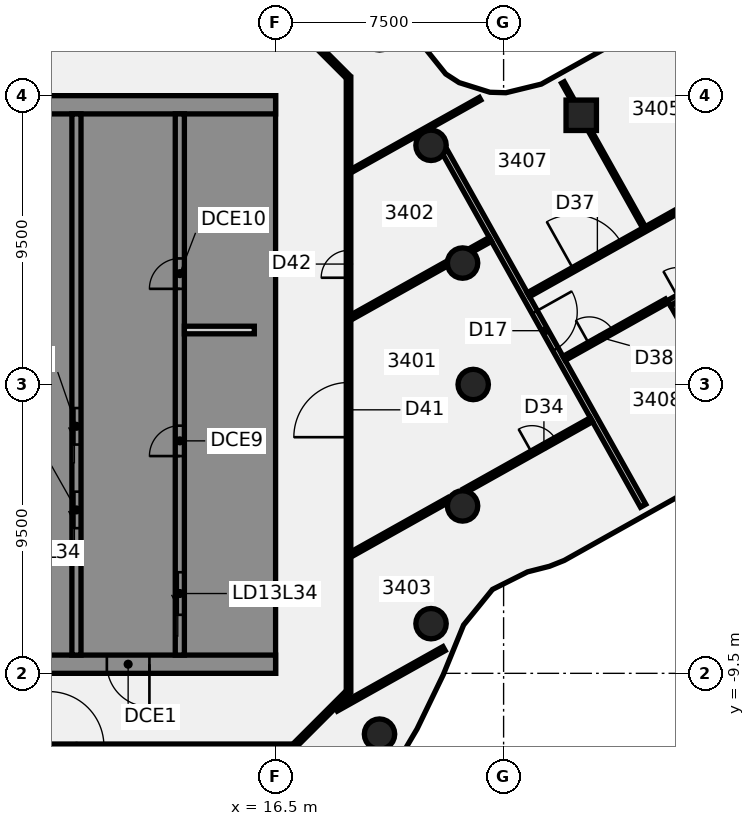
"""IFC4 building model, lengths in metres.
Left out: names, types, materials, properties, quantities, classifications, styles, units other than length and angle.
Written with IfcOpenShell. Run it as: python <this file> out.ifc"""

import sys

from ifc_helpers import new_model, si_unit, direction, frame, frame_2d, origin, origin_2d, place, context, subcontext, project, spatial, polyline, rectangle, circle, outline, extrude, element, fill, save


model = new_model("IFC4")
c1 = context("Model", 3, precision=1e-05, world=origin(), true_north=direction((0.0, 1.0)))
c2 = subcontext(c1, "Body", "Model", "MODEL_VIEW")
j1 = project(units=[si_unit("LENGTHUNIT", "METRE"), si_unit("PLANEANGLEUNIT", "RADIAN")], contexts=[c1])
p1 = place(None, origin())
s1 = spatial("IfcSite", under=j1, at=p1, CompositionType="ELEMENT")
p2 = place(p1, origin())
s2 = spatial("IfcBuilding", under=s1, at=p2, CompositionType="ELEMENT")
p3 = place(p2, frame((0.0, 0.0, 140.5)))
s3 = spatial("IfcBuildingStorey", under=s2, at=p3, CompositionType="ELEMENT", Elevation=140.5)
for number, where, z_axis, x_axis in (
    (1, (23.0, 0.0, -0.14), (0.0, 0.0, 1.0), (1.0, 0.0, 0.0)),
    (2, (22.651, 3.994, -0.14), (0.0, 0.0, 1.0), (1.0, 0.0, 0.0)),
    (3, (21.613, 7.866, -0.14), (0.0, 0.0, 1.0), (1.0, 0.0, 0.0)),
    (4, (19.919, -11.5, -0.14), (0.0, 0.0, 1.0), (1.0, 0.0, 0.0)),
    (5, (21.613, -7.866, -0.14), (0.0, 0.0, 1.0), (1.0, 0.0, 0.0)),
    (6, (22.651, -3.994, -0.14), (0.0, 0.0, 1.0), (1.0, 0.0, 0.0)),
):
    element("IfcColumn", number, at=place(p3, frame(where, z_axis=z_axis, x_axis=x_axis)), inside=s3, PredefinedType="COLUMN", context=c2, shape_type="SweptSolid", body=[
        extrude(circle(Radius=0.5, at=origin_2d()), origin(), (0.0, 0.0, 1.0), 3.75),
    ])
p4 = place(p3, frame((26.553, 8.855, -0.139), z_axis=(-0.043209514738, 0.02173490651, 0.998829580897), x_axis=(0.487666364721, -0.872109852448, 0.040073956407)))
e7 = element("IfcColumn", 7, at=p4, inside=s3, PredefinedType="COLUMN", context=c2, shape_type="SweptSolid", body=[
    extrude(rectangle(XDim=1.0, YDim=1.0, at=origin_2d()), origin(), (0.0, 0.0, 1.0), 3.752),
])
p5 = place(p3, frame((22.067, 7.656, 0.0), z_axis=(0.0, 0.0, 1.0), x_axis=(0.488719781304, -0.872440814819, 0.0)))
e8 = element("IfcWall", 8, at=p5, inside=s3, PredefinedType="PARTITIONING", context=c2, shape_type="SweptSolid", body=[
    extrude(rectangle(XDim=13.346, YDim=0.2, at=frame_2d((6.673, 0.0))), origin(), (0.0, 0.0, 1.0), 3.01),
])
p6 = place(p5, frame((6.048, 0.0, 0.0)))
e9 = element("IfcOpeningElement", 9, at=p6, cuts=e8, PredefinedType="OPENING", context=c2, shape_type="SweptSolid", body=[
    extrude(rectangle(XDim=1.4, YDim=2.1, at=frame_2d((0.7, 1.05))), frame((0.0, 0.11, 0.0), z_axis=(0.0, -1.0, 0.0), x_axis=(1.0, 0.0, 0.0)), (0.0, 0.0, 1.0), 0.22),
])
p7 = place(p3, frame((25.95, 9.931, 0.0), z_axis=(0.0, 0.0, 1.0), x_axis=(0.488985791787, -0.872291749033, 0.0)))
e10 = element("IfcWall", 10, at=p7, inside=s3, PredefinedType="PARTITIONING", context=c2, shape_type="SweptSolid", body=[
    extrude(rectangle(XDim=0.564, YDim=0.1, at=frame_2d((0.282, 0.0))), origin(), (0.0, 0.0, 1.0), 3.01),
])
p8 = place(p3, frame((26.809, 8.399, 0.0), z_axis=(0.0, 0.0, 1.0), x_axis=(0.488685692094, -0.872459909877, 0.0)))
e11 = element("IfcWall", 11, at=p8, inside=s3, PredefinedType="PARTITIONING", context=c2, shape_type="SweptSolid", body=[
    extrude(rectangle(XDim=3.702, YDim=0.1, at=frame_2d((1.851, 0.0))), origin(), (0.0, 0.0, 1.0), 3.01),
])
p9 = place(p3, frame((17.128, 11.872, 0.0), z_axis=(0.0, 0.0, 1.0), x_axis=(0.707106781187, -0.707106781187, 0.0)))
e12 = element("IfcWall", 12, at=p9, inside=s3, PredefinedType="PARTITIONING", context=c2, shape_type="SweptSolid", body=[
    extrude(rectangle(XDim=2.465, YDim=0.15, at=frame_2d((1.232, 0.0))), origin(), (0.0, 0.0, 1.0), 3.01),
])
p10 = place(p3, frame((-17.1, -11.9, 0.0), z_axis=(0.0, 0.0, 1.0), x_axis=(1.0, 0.0, 0.0)))
e13 = element("IfcWall", 13, at=p10, inside=s3, PredefinedType="PARTITIONING", context=c2, shape_type="SweptSolid", body=[
    extrude(rectangle(XDim=34.165, YDim=0.15, at=frame_2d((17.083, 0.0))), origin(), (0.0, 0.0, 1.0), 3.01),
])
p11 = place(p10, frame((10.546, 0.0, 0.0)))
e14 = element("IfcOpeningElement", 14, at=p11, cuts=e13, PredefinedType="OPENING", context=c2, shape_type="SweptSolid", body=[
    extrude(rectangle(XDim=1.8, YDim=2.1, at=frame_2d((0.9, 1.05))), frame((0.0, 0.085, 0.0), z_axis=(0.0, -1.0, 0.0), x_axis=(1.0, 0.0, 0.0)), (0.0, 0.0, 1.0), 0.17),
])
p12 = place(p10, frame((2.7, 0.0, 0.0)))
e15 = element("IfcOpeningElement", 15, at=p12, cuts=e13, PredefinedType="OPENING", context=c2, shape_type="SweptSolid", body=[
    extrude(rectangle(XDim=1.8, YDim=2.1, at=frame_2d((0.9, 1.05))), frame((0.0, 0.085, 0.0), z_axis=(0.0, -1.0, 0.0), x_axis=(1.0, 0.0, 0.0)), (0.0, 0.0, 1.0), 0.17),
])
p13 = place(p10, frame((26.154, 0.0, 0.0)))
e16 = element("IfcOpeningElement", 16, at=p13, cuts=e13, PredefinedType="OPENING", context=c2, shape_type="SweptSolid", body=[
    extrude(rectangle(XDim=1.8, YDim=2.1, at=frame_2d((0.9, 1.05))), frame((0.0, 0.085, 0.0), z_axis=(0.0, -1.0, 0.0), x_axis=(1.0, 0.0, 0.0)), (0.0, 0.0, 1.0), 0.17),
])
p14 = place(p3, frame((18.494, -10.675, 0.0), z_axis=(0.0, 0.0, 1.0), x_axis=(0.872412835083, 0.488769726131, 0.0)))
e17 = element("IfcWall", 17, at=p14, inside=s3, PredefinedType="PARTITIONING", context=c2, shape_type="SweptSolid", body=[
    extrude(rectangle(XDim=4.066, YDim=0.15, at=frame_2d((2.033, 0.0))), origin(), (0.0, 0.0, 1.0), 3.01),
])
p15 = place(p3, frame((18.996, -5.579, 0.0), z_axis=(0.0, 0.0, 1.0), x_axis=(0.872475366489, 0.488658096086, 0.0)))
e18 = element("IfcWall", 18, at=p15, inside=s3, PredefinedType="PARTITIONING", context=c2, shape_type="SweptSolid", body=[
    extrude(rectangle(XDim=3.668, YDim=0.15, at=frame_2d((1.834, 0.0))), origin(), (0.0, 0.0, 1.0), 3.01),
])
p16 = place(p3, frame((22.709, -3.5, 0.0), z_axis=(0.0, 0.0, 1.0), x_axis=(0.872484295483, 0.488642153458, 0.0)))
e19 = element("IfcWall", 19, at=p16, inside=s3, PredefinedType="PARTITIONING", context=c2, shape_type="SweptSolid", body=[
    extrude(rectangle(XDim=4.792, YDim=0.15, at=frame_2d((2.396, 0.0))), origin(), (0.0, 0.0, 1.0), 3.01),
])
p17 = place(p16, frame((2.55, 0.0, 0.0)))
e20 = element("IfcOpeningElement", 20, at=p17, cuts=e19, PredefinedType="OPENING", context=c2, shape_type="SweptSolid", body=[
    extrude(rectangle(XDim=0.9, YDim=2.1, at=frame_2d((0.45, 1.05))), frame((0.0, 0.085, 0.0), z_axis=(0.0, -1.0, 0.0), x_axis=(1.0, 0.0, 0.0)), (0.0, 0.0, 1.0), 0.17),
])
p18 = place(p3, frame((18.996, 2.215, 0.0), z_axis=(0.0, 0.0, 1.0), x_axis=(0.872502555335, 0.488609548549, 0.0)))
e21 = element("IfcWall", 21, at=p18, inside=s3, PredefinedType="PARTITIONING", context=c2, shape_type="SweptSolid", body=[
    extrude(rectangle(XDim=3.609, YDim=0.15, at=frame_2d((1.805, 0.0))), origin(), (0.0, 0.0, 1.0), 3.01),
])
p19 = place(p3, frame((22.926, 4.415, 0.0), z_axis=(0.0, 0.0, 1.0), x_axis=(0.87250601595, 0.488603368932, 0.0)))
e22 = element("IfcWall", 22, at=p19, inside=s3, PredefinedType="PARTITIONING", context=c2, shape_type="SweptSolid", body=[
    extrude(rectangle(XDim=0.735, YDim=0.15, at=frame_2d((0.367, 0.0))), origin(), (0.0, 0.0, 1.0), 3.01),
])
p20 = place(p3, frame((18.983, 7.021, 0.0), z_axis=(0.0, 0.0, 1.0), x_axis=(0.872449517154, 0.488704245959, 0.0)))
e23 = element("IfcWall", 23, at=p20, inside=s3, PredefinedType="PARTITIONING", context=c2, shape_type="SweptSolid", body=[
    extrude(rectangle(XDim=4.864, YDim=0.1, at=frame_2d((2.432, 0.0))), origin(), (0.0, 0.0, 1.0), 3.01),
])
p21 = place(p3, frame((24.816, 2.953, 0.0), z_axis=(0.0, 0.0, 1.0), x_axis=(0.87246758345, 0.488671992066, 0.0)))
e24 = element("IfcWall", 24, at=p21, inside=s3, PredefinedType="PARTITIONING", context=c2, shape_type="SweptSolid", body=[
    extrude(rectangle(XDim=13.325, YDim=0.15, at=frame_2d((6.663, 0.0))), origin(), (0.0, 0.0, 1.0), 3.01),
])
p22 = place(p21, frame((6.8, 0.0, 0.0)))
e25 = element("IfcOpeningElement", 25, at=p22, cuts=e24, PredefinedType="OPENING", context=c2, shape_type="SweptSolid", body=[
    extrude(rectangle(XDim=0.9, YDim=2.1, at=frame_2d((0.45, 1.05))), frame((0.0, 0.085, 0.0), z_axis=(0.0, -1.0, 0.0), x_axis=(1.0, 0.0, 0.0)), (0.0, 0.0, 1.0), 0.17),
])
p23 = place(p21, frame((10.1, 0.0, 0.0)))
e26 = element("IfcOpeningElement", 26, at=p23, cuts=e24, PredefinedType="OPENING", context=c2, shape_type="SweptSolid", body=[
    extrude(rectangle(XDim=0.9, YDim=2.1, at=frame_2d((0.45, 1.05))), frame((0.0, 0.085, 0.0), z_axis=(0.0, -1.0, 0.0), x_axis=(1.0, 0.0, 0.0)), (0.0, 0.0, 1.0), 0.17),
])
p24 = place(p21, frame((1.7, 0.0, 0.0)))
e27 = element("IfcOpeningElement", 27, at=p24, cuts=e24, PredefinedType="OPENING", context=c2, shape_type="SweptSolid", body=[
    extrude(rectangle(XDim=1.8, YDim=2.1, at=frame_2d((0.9, 1.05))), frame((0.0, 0.085, 0.0), z_axis=(0.0, -1.0, 0.0), x_axis=(1.0, 0.0, 0.0)), (0.0, 0.0, 1.0), 0.17),
])
p25 = place(p3, frame((25.989, 0.859, 0.0), z_axis=(0.0, 0.0, 1.0), x_axis=(0.872442375401, 0.488716995413, 0.0)))
e28 = element("IfcWall", 28, at=p25, inside=s3, PredefinedType="PARTITIONING", context=c2, shape_type="SweptSolid", body=[
    extrude(rectangle(XDim=3.86, YDim=0.15, at=frame_2d((1.93, 0.0))), origin(), (0.0, 0.0, 1.0), 3.01),
])
p26 = place(p25, frame((0.95, 0.0, 0.0)))
e29 = element("IfcOpeningElement", 29, at=p26, cuts=e28, PredefinedType="OPENING", context=c2, shape_type="SweptSolid", body=[
    extrude(rectangle(XDim=0.9, YDim=2.1, at=frame_2d((0.45, 1.05))), frame((0.0, 0.085, 0.0), z_axis=(0.0, -1.0, 0.0), x_axis=(1.0, 0.0, 0.0)), (0.0, 0.0, 1.0), 0.17),
])
p27 = place(p3, frame((17.1, -11.9, 0.0), z_axis=(0.0, 0.0, 1.0), x_axis=(0.707106781187, 0.707106781187, 0.0)))
e30 = element("IfcWall", 30, at=p27, inside=s3, PredefinedType="PARTITIONING", context=c2, shape_type="SweptSolid", body=[
    extrude(rectangle(XDim=2.505, YDim=0.15, at=frame_2d((1.253, 0.0))), origin(), (0.0, 0.0, 1.0), 3.01),
])
p28 = place(p3, frame((18.9, -10.1, 0.0), z_axis=(0.0, 0.0, 1.0), x_axis=(0.0, 1.0, 0.0)))
e31 = element("IfcWall", 31, at=p28, inside=s3, PredefinedType="PARTITIONING", context=c2, shape_type="SweptSolid", body=[
    extrude(rectangle(XDim=20.2, YDim=0.15, at=frame_2d((10.1, 0.0))), origin(), (0.0, 0.0, 1.0), 3.01),
])
p29 = place(p28, frame((8.367, 0.0, 0.0)))
e32 = element("IfcOpeningElement", 32, at=p29, cuts=e31, PredefinedType="OPENING", context=c2, shape_type="SweptSolid", body=[
    extrude(rectangle(XDim=1.8, YDim=2.1, at=frame_2d((0.9, 1.05))), frame((0.0, 0.085, 0.0), z_axis=(0.0, -1.0, 0.0), x_axis=(1.0, 0.0, 0.0)), (0.0, 0.0, 1.0), 0.17),
])
p30 = place(p28, frame((13.611, 0.0, 0.0)))
e33 = element("IfcOpeningElement", 33, at=p30, cuts=e31, PredefinedType="OPENING", context=c2, shape_type="SweptSolid", body=[
    extrude(rectangle(XDim=0.9, YDim=2.1, at=frame_2d((0.45, 1.05))), frame((0.0, 0.085, 0.0), z_axis=(0.0, -1.0, 0.0), x_axis=(1.0, 0.0, 0.0)), (0.0, 0.0, 1.0), 0.17),
])
p31 = place(p3, frame((16.5, -9.2, 0.0), z_axis=(0.0, 0.0, 1.0), x_axis=(-1.0, 0.0, 0.0)))
e34 = element("IfcWall", 34, at=p31, inside=s3, PredefinedType="SHEAR", context=c2, shape_type="SweptSolid", body=[
    extrude(rectangle(XDim=13.0, YDim=0.6, at=frame_2d((6.5, 0.0))), origin(), (0.0, 0.0, 1.0), 3.61),
])
p32 = place(p31, frame((4.15, 0.0, 0.0)))
e35 = element("IfcOpeningElement", 35, at=p32, cuts=e34, PredefinedType="OPENING", context=c2, shape_type="SweptSolid", body=[
    extrude(rectangle(XDim=1.4, YDim=2.1, at=frame_2d((0.7, 1.05))), frame((0.0, 0.31, 0.0), z_axis=(0.0, -1.0, 0.0), x_axis=(1.0, 0.0, 0.0)), (0.0, 0.0, 1.0), 0.62),
])
p33 = place(p31, frame((10.125, 0.0, 0.0)))
e36 = element("IfcOpeningElement", 36, at=p33, cuts=e34, PredefinedType="OPENING", context=c2, shape_type="SweptSolid", body=[
    extrude(rectangle(XDim=1.4, YDim=2.1, at=frame_2d((0.7, 1.05))), frame((0.0, 0.31, 0.0), z_axis=(0.0, -1.0, 0.0), x_axis=(1.0, 0.0, 0.0)), (0.0, 0.0, 1.0), 0.62),
])
p34 = place(p3, origin())
e37 = element("IfcWall", 37, at=p34, inside=s3, PredefinedType="SHEAR", context=c2, shape_type="SweptSolid", body=[
    extrude(outline(polyline([(13.5, -8.125), (13.5, -8.9), (15.9, -8.9), (16.5, -8.9), (16.5, 8.9), (15.9, 8.9), (13.5, 8.9), (13.5, 8.125), (15.9, 8.125), (15.9, 5.625), (13.5, 5.625), (13.5, 5.375), (15.9, 5.375), (15.9, -5.375), (13.5, -5.375), (13.5, -5.625), (15.9, -5.625), (15.9, -8.125), (13.5, -8.125)])), origin(), (0.0, 0.0, 1.0), 3.61),
])
p35 = place(p3, frame((16.5, 9.2, 0.0), z_axis=(0.0, 0.0, 1.0), x_axis=(-1.0, 0.0, 0.0)))
e38 = element("IfcWall", 38, at=p35, inside=s3, PredefinedType="SHEAR", context=c2, shape_type="SweptSolid", body=[
    extrude(rectangle(XDim=13.0, YDim=0.6, at=frame_2d((6.5, 0.0))), origin(), (0.0, 0.0, 1.0), 3.61),
])
p36 = place(p3, origin())
e39 = element("IfcWall", 39, at=p36, inside=s3, PredefinedType="SHEAR", context=c2, shape_type="SweptSolid", body=[
    extrude(outline(polyline([(9.8, -5.375), (7.5, -5.375), (7.5, -2.875), (9.8, -2.875), (9.8, -2.625), (7.5, -2.625), (7.5, -0.125), (9.8, -0.125), (9.8, 0.125), (7.5, 0.125), (7.5, 2.625), (9.8, 2.625), (9.8, 2.875), (7.5, 2.875), (7.5, 5.375), (9.8, 5.375), (9.8, 5.625), (7.5, 5.625), (7.5, 8.125), (9.8, 8.125), (9.8, 8.9), (7.5, 8.9), (7.2, 8.9), (7.2, -5.625), (7.5, -5.625), (9.8, -5.625), (9.8, -5.375)])), origin(), (0.0, 0.0, 1.0), 3.61),
])
p37 = place(p3, origin())
e40 = element("IfcWall", 40, at=p37, inside=s3, PredefinedType="SHEAR", context=c2, shape_type="SweptSolid", body=[
    extrude(outline(polyline([(7.5, -8.125), (7.5, -8.9), (9.8, -8.9), (9.8, -8.125), (9.8, -5.625), (9.55, -5.625), (9.55, -8.125), (7.5, -8.125)])), origin(), (0.0, 0.0, 1.0), 3.61),
])
p38 = place(p3, frame((13.35, -8.9, 0.0), z_axis=(0.0, 0.0, 1.0), x_axis=(0.0, 1.0, 0.0)))
e41 = element("IfcWall", 41, at=p38, inside=s3, PredefinedType="SHEAR", context=c2, shape_type="SweptSolid", body=[
    extrude(rectangle(XDim=17.8, YDim=0.3, at=frame_2d((8.9, 0.0))), origin(), (0.0, 0.0, 1.0), 3.61),
])
p39 = place(p38, frame((1.325, 0.0, 0.0)))
e42 = element("IfcOpeningElement", 42, at=p39, cuts=e41, PredefinedType="OPENING", context=c2, shape_type="SweptSolid", body=[
    extrude(rectangle(XDim=1.4, YDim=2.1, at=frame_2d((0.7, 1.05))), frame((0.0, 0.16, 0.0), z_axis=(0.0, -1.0, 0.0), x_axis=(1.0, 0.0, 0.0)), (0.0, 0.0, 1.0), 0.32),
])
p40 = place(p38, frame((6.546, 0.0, 0.0)))
e43 = element("IfcOpeningElement", 43, at=p40, cuts=e41, PredefinedType="OPENING", context=c2, shape_type="SweptSolid", body=[
    extrude(rectangle(XDim=1.0, YDim=2.1, at=frame_2d((0.5, 1.05))), frame((0.0, 0.16, 0.0), z_axis=(0.0, -1.0, 0.0), x_axis=(1.0, 0.0, 0.0)), (0.0, 0.0, 1.0), 0.32),
])
p41 = place(p38, frame((12.046, 0.0, 0.0)))
e44 = element("IfcOpeningElement", 44, at=p41, cuts=e41, PredefinedType="OPENING", context=c2, shape_type="SweptSolid", body=[
    extrude(rectangle(XDim=1.0, YDim=2.1, at=frame_2d((0.5, 1.05))), frame((0.0, 0.16, 0.0), z_axis=(0.0, -1.0, 0.0), x_axis=(1.0, 0.0, 0.0)), (0.0, 0.0, 1.0), 0.32),
])
p42 = place(p3, frame((9.95, -8.9, 0.0), z_axis=(0.0, 0.0, 1.0), x_axis=(0.0, 1.0, 0.0)))
e45 = element("IfcWall", 45, at=p42, inside=s3, PredefinedType="SHEAR", context=c2, shape_type="SweptSolid", body=[
    extrude(rectangle(XDim=17.8, YDim=0.3, at=frame_2d((8.9, 0.0))), origin(), (0.0, 0.0, 1.0), 3.61),
])
p43 = place(p42, frame((4.175, 0.0, 0.0)))
e46 = element("IfcOpeningElement", 46, at=p43, cuts=e45, PredefinedType="OPENING", context=c2, shape_type="SweptSolid", body=[
    extrude(rectangle(XDim=1.2, YDim=2.1, at=frame_2d((0.6, 1.05))), frame((0.0, 0.16, 0.0), z_axis=(0.0, -1.0, 0.0), x_axis=(1.0, 0.0, 0.0)), (0.0, 0.0, 1.0), 0.32),
])
p44 = place(p42, frame((6.925, 0.0, 0.0)))
e47 = element("IfcOpeningElement", 47, at=p44, cuts=e45, PredefinedType="OPENING", context=c2, shape_type="SweptSolid", body=[
    extrude(rectangle(XDim=1.2, YDim=2.1, at=frame_2d((0.6, 1.05))), frame((0.0, 0.16, 0.0), z_axis=(0.0, -1.0, 0.0), x_axis=(1.0, 0.0, 0.0)), (0.0, 0.0, 1.0), 0.32),
])
p45 = place(p3, frame((15.8, 1.792, 0.0), z_axis=(0.0, 0.0, 1.0), x_axis=(-1.0, 0.0, 0.0)))
e48 = element("IfcWall", 48, at=p45, inside=s3, PredefinedType="PARTITIONING", context=c2, shape_type="SweptSolid", body=[
    extrude(rectangle(XDim=2.3, YDim=0.25, at=frame_2d((1.15, 0.0))), origin(), (0.0, 0.0, 1.0), 3.61),
])
p46 = place(p3, frame((29.44, 2.677, -0.14), z_axis=(0.0, 0.0, 1.0), x_axis=(0.872445115734, 0.488712103422, 0.0)))
e49 = element("IfcWall", 49, at=p46, inside=s3, PredefinedType="SHEAR", context=c2, shape_type="SweptSolid", body=[
    extrude(rectangle(XDim=6.7, YDim=0.2, at=frame_2d((3.35, 0.0))), origin(), (0.0, 0.0, 1.0), 3.15),
])
p47 = place(p46, frame((0.35, 0.0, 0.0)))
e50 = element("IfcOpeningElement", 50, at=p47, cuts=e49, PredefinedType="OPENING", context=c2, shape_type="SweptSolid", body=[
    extrude(rectangle(XDim=1.0, YDim=2.1, at=frame_2d((0.5, 1.05))), frame((0.0, 0.11, 0.0), z_axis=(0.0, -1.0, 0.0), x_axis=(1.0, 0.0, 0.0)), (0.0, 0.0, 1.0), 0.22),
])
p48 = place(p3, frame((31.14, -0.153, -0.14), z_axis=(0.0, 0.0, 1.0), x_axis=(-0.488684682526, 0.87246047536, 0.0)))
e51 = element("IfcWall", 51, at=p48, inside=s3, PredefinedType="SHEAR", context=c2, shape_type="SweptSolid", body=[
    extrude(rectangle(XDim=3.2, YDim=0.2, at=frame_2d((1.6, 0.0))), origin(), (0.0, 0.0, 1.0), 3.15),
])
p49 = place(p6, frame((1.4, 0.0, 0.0), z_axis=(0.0, 0.0, 1.0), x_axis=(-1.0, 0.0, 0.0)))
e52 = element("IfcDoor", 52, at=p49, inside=s3, OperationType="DOUBLE_DOOR_SINGLE_SWING", PredefinedType="DOOR", context=c2, shape_type="SweptSolid", body=[
    extrude(rectangle(XDim=1.4, YDim=2.1, at=frame_2d((0.7, 1.05))), frame((0.0, 0.025, 0.0), z_axis=(0.0, -1.0, 0.0), x_axis=(1.0, 0.0, 0.0)), (0.0, 0.0, 1.0), 0.05),
])
fill(e9, e52)
p50 = place(p13, frame((1.8, 0.0, 0.0), z_axis=(0.0, 0.0, 1.0), x_axis=(-1.0, 0.0, 0.0)))
e53 = element("IfcDoor", 53, at=p50, inside=s3, OperationType="DOUBLE_DOOR_SINGLE_SWING", PredefinedType="DOOR", context=c2, shape_type="SweptSolid", body=[
    extrude(rectangle(XDim=1.8, YDim=2.1, at=frame_2d((0.9, 1.05))), frame((0.0, 0.025, 0.0), z_axis=(0.0, -1.0, 0.0), x_axis=(1.0, 0.0, 0.0)), (0.0, 0.0, 1.0), 0.05),
])
fill(e16, e53)
p51 = place(p17, frame((0.9, 0.0, 0.0), z_axis=(0.0, 0.0, 1.0), x_axis=(-1.0, 0.0, 0.0)))
e54 = element("IfcDoor", 54, at=p51, inside=s3, OperationType="SINGLE_SWING_RIGHT", PredefinedType="DOOR", context=c2, shape_type="SweptSolid", body=[
    extrude(rectangle(XDim=0.9, YDim=2.1, at=frame_2d((0.45, 1.05))), frame((0.0, 0.025, 0.0), z_axis=(0.0, -1.0, 0.0), x_axis=(1.0, 0.0, 0.0)), (0.0, 0.0, 1.0), 0.05),
])
fill(e20, e54)
p52 = place(p24, origin())
e55 = element("IfcDoor", 55, at=p52, inside=s3, OperationType="DOUBLE_DOOR_SINGLE_SWING", PredefinedType="DOOR", context=c2, shape_type="SweptSolid", body=[
    extrude(rectangle(XDim=1.8, YDim=2.1, at=frame_2d((0.9, 1.05))), frame((0.0, 0.025, 0.0), z_axis=(0.0, -1.0, 0.0), x_axis=(1.0, 0.0, 0.0)), (0.0, 0.0, 1.0), 0.05),
])
fill(e27, e55)
p53 = place(p26, frame((0.9, 0.0, 0.0), z_axis=(0.0, 0.0, 1.0), x_axis=(-1.0, 0.0, 0.0)))
e56 = element("IfcDoor", 56, at=p53, inside=s3, OperationType="SINGLE_SWING_LEFT", PredefinedType="DOOR", context=c2, shape_type="SweptSolid", body=[
    extrude(rectangle(XDim=0.9, YDim=2.1, at=frame_2d((0.45, 1.05))), frame((0.0, 0.025, 0.0), z_axis=(0.0, -1.0, 0.0), x_axis=(1.0, 0.0, 0.0)), (0.0, 0.0, 1.0), 0.05),
])
fill(e29, e56)
p54 = place(p29, origin())
e57 = element("IfcDoor", 57, at=p54, inside=s3, OperationType="DOUBLE_DOOR_SINGLE_SWING", PredefinedType="DOOR", context=c2, shape_type="SweptSolid", body=[
    extrude(rectangle(XDim=1.8, YDim=2.1, at=frame_2d((0.9, 1.05))), frame((0.0, 0.025, 0.0), z_axis=(0.0, -1.0, 0.0), x_axis=(1.0, 0.0, 0.0)), (0.0, 0.0, 1.0), 0.05),
])
fill(e32, e57)
p55 = place(p30, frame((0.9, 0.0, 0.0), z_axis=(0.0, 0.0, 1.0), x_axis=(-1.0, 0.0, 0.0)))
e58 = element("IfcDoor", 58, at=p55, inside=s3, OperationType="SINGLE_SWING_RIGHT", PredefinedType="DOOR", context=c2, shape_type="SweptSolid", body=[
    extrude(rectangle(XDim=0.9, YDim=2.1, at=frame_2d((0.45, 1.05))), frame((0.0, 0.025, 0.0), z_axis=(0.0, -1.0, 0.0), x_axis=(1.0, 0.0, 0.0)), (0.0, 0.0, 1.0), 0.05),
])
fill(e33, e58)
p56 = place(p32, origin())
e59 = element("IfcDoor", 59, at=p56, inside=s3, OperationType="SINGLE_SWING_LEFT", PredefinedType="DOOR", context=c2, shape_type="SweptSolid", body=[
    extrude(rectangle(XDim=1.4, YDim=2.1, at=frame_2d((0.7, 1.05))), frame((0.0, 0.025, 0.0), z_axis=(0.0, -1.0, 0.0), x_axis=(1.0, 0.0, 0.0)), (0.0, 0.0, 1.0), 0.05),
])
fill(e35, e59)
p57 = place(p39, origin())
e60 = element("IfcDoor", 60, at=p57, inside=s3, OperationType="SLIDING_TO_LEFT", PredefinedType="DOOR", context=c2, shape_type="SweptSolid", body=[
    extrude(rectangle(XDim=1.4, YDim=2.1, at=frame_2d((0.7, 1.05))), frame((0.0, 0.025, 0.0), z_axis=(0.0, -1.0, 0.0), x_axis=(1.0, 0.0, 0.0)), (0.0, 0.0, 1.0), 0.05),
])
fill(e42, e60)
p58 = place(p43, origin())
e61 = element("IfcDoor", 61, at=p58, inside=s3, OperationType="SLIDING_TO_LEFT", PredefinedType="DOOR", context=c2, shape_type="SweptSolid", body=[
    extrude(rectangle(XDim=1.2, YDim=2.1, at=frame_2d((0.6, 1.05))), frame((0.0, 0.025, 0.0), z_axis=(0.0, -1.0, 0.0), x_axis=(1.0, 0.0, 0.0)), (0.0, 0.0, 1.0), 0.05),
])
fill(e46, e61)
p59 = place(p44, origin())
e62 = element("IfcDoor", 62, at=p59, inside=s3, OperationType="SLIDING_TO_LEFT", PredefinedType="DOOR", context=c2, shape_type="SweptSolid", body=[
    extrude(rectangle(XDim=1.2, YDim=2.1, at=frame_2d((0.6, 1.05))), frame((0.0, 0.025, 0.0), z_axis=(0.0, -1.0, 0.0), x_axis=(1.0, 0.0, 0.0)), (0.0, 0.0, 1.0), 0.05),
])
fill(e47, e62)
p60 = place(p40, origin())
e63 = element("IfcDoor", 63, at=p60, inside=s3, OperationType="SINGLE_SWING_LEFT", PredefinedType="DOOR", context=c2, shape_type="SweptSolid", body=[
    extrude(rectangle(XDim=1.0, YDim=2.1, at=frame_2d((0.5, 1.05))), frame((0.0, 0.025, 0.0), z_axis=(0.0, -1.0, 0.0), x_axis=(1.0, 0.0, 0.0)), (0.0, 0.0, 1.0), 0.05),
])
fill(e43, e63)
p61 = place(p41, origin())
e64 = element("IfcDoor", 64, at=p61, inside=s3, OperationType="SINGLE_SWING_LEFT", PredefinedType="DOOR", context=c2, shape_type="SweptSolid", body=[
    extrude(rectangle(XDim=1.0, YDim=2.1, at=frame_2d((0.5, 1.05))), frame((0.0, 0.025, 0.0), z_axis=(0.0, -1.0, 0.0), x_axis=(1.0, 0.0, 0.0)), (0.0, 0.0, 1.0), 0.05),
])
fill(e44, e64)
save(model, sys.argv[1])
